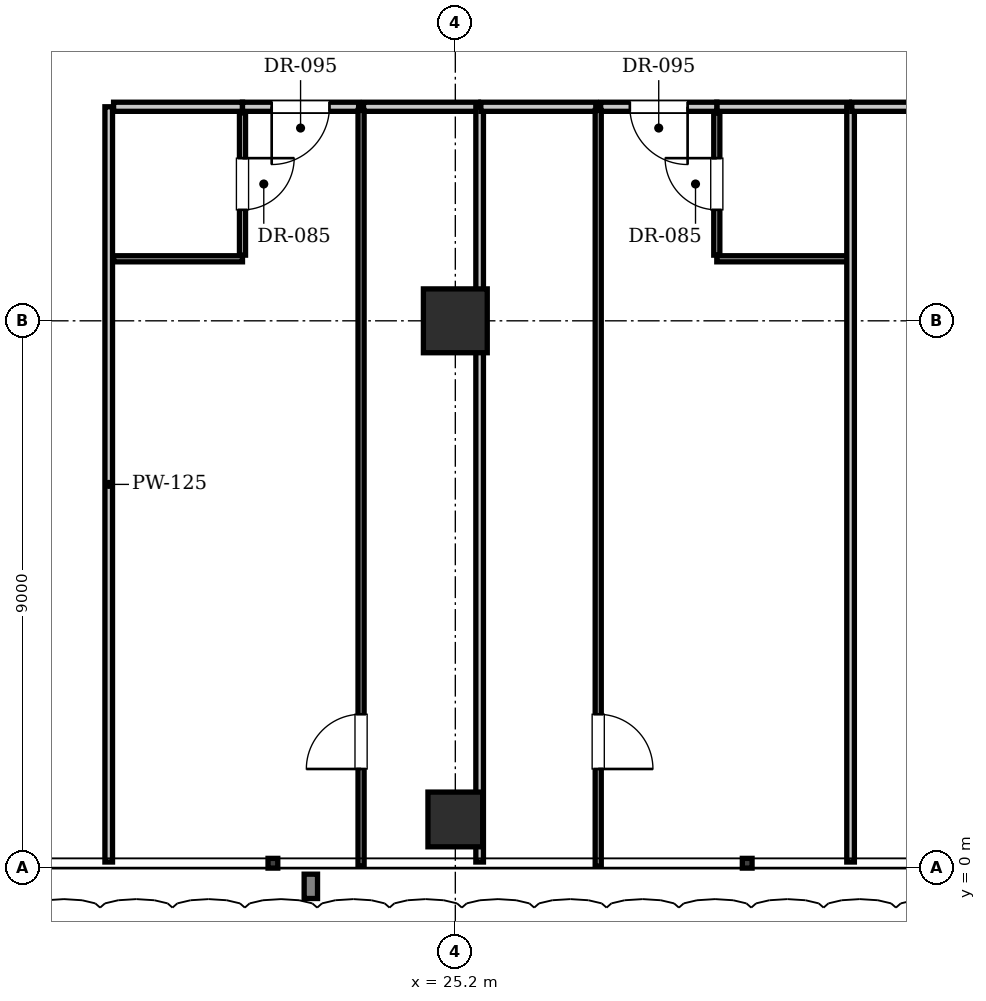
"""IFC4 building model, lengths in metres.
Left out: names, types, materials, properties, quantities, classifications, styles, units other than length and angle.
Written with IfcOpenShell. Run it as: python <this file> out.ifc"""

import sys

from ifc_helpers import new_model, si_unit, direction, frame, frame_2d, origin, origin_2d, place, context, subcontext, project, spatial, rectangle, extrude, element, fill, save


model = new_model("IFC4")
c1 = context("Model", 3, precision=1e-05, world=origin(), true_north=direction((0.0, 1.0)))
c2 = subcontext(c1, "Body", "Model", "MODEL_VIEW")
j1 = project(units=[si_unit("LENGTHUNIT", "METRE"), si_unit("PLANEANGLEUNIT", "RADIAN")], contexts=[c1])
p1 = place(None, origin())
s1 = spatial("IfcSite", under=j1, at=p1, CompositionType="ELEMENT")
p2 = place(p1, origin())
s2 = spatial("IfcBuilding", under=s1, at=p2, CompositionType="ELEMENT")
p3 = place(p2, frame((0.0, 0.0, 38.5)))
s3 = spatial("IfcBuildingStorey", under=s2, at=p3, CompositionType="ELEMENT", Elevation=38.5)
p4 = place(p3, frame((25.2, 9.0, 0.0), z_axis=(0.0, 0.0, 1.0), x_axis=(1.0, 0.0, 0.0)))
e1 = element("IfcColumn", 1, at=p4, inside=s3, PredefinedType="COLUMN", context=c2, shape_type="SweptSolid", body=[
    extrude(rectangle(XDim=1.05, YDim=1.05, at=origin_2d()), origin(), (0.0, 0.0, 1.0), 3.85),
])
p5 = place(p3, frame((25.2, 0.8, 0.0), z_axis=(0.0, 0.0, 1.0), x_axis=(1.0, 0.0, 0.0)))
e2 = element("IfcColumn", 2, at=p5, inside=s3, PredefinedType="COLUMN", context=c2, shape_type="SweptSolid", body=[
    extrude(rectangle(XDim=0.9, YDim=0.9, at=origin_2d()), origin(), (0.0, 0.0, 1.0), 3.85),
])
p6 = place(p3, frame((19.5, 0.1, 0.0), z_axis=(0.0, 0.0, 1.0), x_axis=(0.0, 1.0, 0.0)))
e3 = element("IfcWall", 3, at=p6, inside=s3, PredefinedType="PARTITIONING", context=c2, shape_type="SweptSolid", body=[
    extrude(rectangle(XDim=12.42, YDim=0.125, at=frame_2d((6.21, 0.0))), origin(), (0.0, 0.0, 1.0), 3.61),
])
p7 = place(p3, frame((19.58, 12.52, 0.0), z_axis=(0.0, 0.0, 1.0), x_axis=(1.0, 0.0, 0.0)))
e4 = element("IfcWall", 4, at=p7, inside=s3, PredefinedType="PARTITIONING", context=c2, shape_type="SweptSolid", body=[
    extrude(rectangle(XDim=2.12, YDim=0.15, at=frame_2d((1.06, 0.0))), origin(), (0.0, 0.0, 1.0), 3.61),
])
p8 = place(p3, frame((19.58, 10.02, 0.0), z_axis=(0.0, 0.0, 1.0), x_axis=(1.0, 0.0, 0.0)))
e5 = element("IfcWall", 5, at=p8, inside=s3, PredefinedType="PARTITIONING", context=c2, shape_type="SweptSolid", body=[
    extrude(rectangle(XDim=2.12, YDim=0.1, at=frame_2d((1.06, 0.0))), origin(), (0.0, 0.0, 1.0), 3.61),
])
p9 = place(p3, frame((21.7, 10.08, 0.0), z_axis=(0.0, 0.0, 1.0), x_axis=(0.0, 1.0, 0.0)))
e6 = element("IfcWall", 6, at=p9, inside=s3, PredefinedType="PARTITIONING", context=c2, shape_type="SweptSolid", body=[
    extrude(rectangle(XDim=2.34, YDim=0.1, at=frame_2d((1.17, 0.0))), origin(), (0.0, 0.0, 1.0), 3.61),
])
p10 = place(p9, frame((0.745, 0.0, 0.0)))
e7 = element("IfcOpeningElement", 7, at=p10, cuts=e6, PredefinedType="OPENING", context=c2, shape_type="SweptSolid", body=[
    extrude(rectangle(XDim=0.85, YDim=2.1, at=frame_2d((0.425, 1.05))), frame((0.0, 0.06, 0.0), z_axis=(0.0, -1.0, 0.0), x_axis=(1.0, 0.0, 0.0)), (0.0, 0.0, 1.0), 0.12),
])
p11 = place(p3, frame((21.7, 12.52, 0.0), z_axis=(0.0, 0.0, 1.0), x_axis=(1.0, 0.0, 0.0)))
e8 = element("IfcWall", 8, at=p11, inside=s3, PredefinedType="PARTITIONING", context=c2, shape_type="SweptSolid", body=[
    extrude(rectangle(XDim=1.91, YDim=0.15, at=frame_2d((0.955, 0.0))), origin(), (0.0, 0.0, 1.0), 3.61),
])
p12 = place(p11, frame((0.48, 0.0, 0.0)))
e9 = element("IfcOpeningElement", 9, at=p12, cuts=e8, PredefinedType="OPENING", context=c2, shape_type="SweptSolid", body=[
    extrude(rectangle(XDim=0.95, YDim=2.15, at=frame_2d((0.475, 1.075))), frame((0.0, 0.085, 0.0), z_axis=(0.0, -1.0, 0.0), x_axis=(1.0, 0.0, 0.0)), (0.0, 0.0, 1.0), 0.17),
])
p13 = place(p3, frame((23.69, 12.52, 0.0), z_axis=(0.0, 0.0, 1.0), x_axis=(1.0, 0.0, 0.0)))
e10 = element("IfcWall", 10, at=p13, inside=s3, PredefinedType="PARTITIONING", context=c2, shape_type="SweptSolid", body=[
    extrude(rectangle(XDim=1.89, YDim=0.15, at=frame_2d((0.945, 0.0))), origin(), (0.0, 0.0, 1.0), 3.61),
])
p14 = place(p3, frame((23.65, 0.03, 0.0), z_axis=(0.0, 0.0, 1.0), x_axis=(0.0, 1.0, 0.0)))
e11 = element("IfcWall", 11, at=p14, inside=s3, PredefinedType="PARTITIONING", context=c2, shape_type="SweptSolid", body=[
    extrude(rectangle(XDim=12.43, YDim=0.1, at=frame_2d((6.215, 0.0))), origin(), (0.0, 0.0, 1.0), 3.61),
])
p15 = place(p14, frame((1.6, 0.0, 0.0)))
e12 = element("IfcOpeningElement", 12, at=p15, cuts=e11, PredefinedType="OPENING", context=c2, shape_type="SweptSolid", body=[
    extrude(rectangle(XDim=0.9, YDim=2.1, at=frame_2d((0.45, 1.05))), frame((0.0, 0.06, 0.0), z_axis=(0.0, -1.0, 0.0), x_axis=(1.0, 0.0, 0.0)), (0.0, 0.0, 1.0), 0.12),
])
p16 = place(p3, frame((25.6, 0.1, 0.0), z_axis=(0.0, 0.0, 1.0), x_axis=(0.0, 1.0, 0.0)))
e13 = element("IfcWall", 13, at=p16, inside=s3, PredefinedType="PARTITIONING", context=c2, shape_type="SweptSolid", body=[
    extrude(rectangle(XDim=12.42, YDim=0.125, at=frame_2d((6.21, 0.0))), origin(), (0.0, 0.0, 1.0), 3.61),
])
p17 = place(p3, frame((29.5, 12.52, 0.0), z_axis=(0.0, 0.0, 1.0), x_axis=(1.0, 0.0, 0.0)))
e14 = element("IfcWall", 14, at=p17, inside=s3, PredefinedType="PARTITIONING", context=c2, shape_type="SweptSolid", body=[
    extrude(rectangle(XDim=2.18, YDim=0.15, at=frame_2d((1.09, 0.0))), origin(), (0.0, 0.0, 1.0), 3.61),
])
p18 = place(p3, frame((29.5, 10.02, 0.0), z_axis=(0.0, 0.0, 1.0), x_axis=(1.0, 0.0, 0.0)))
e15 = element("IfcWall", 15, at=p18, inside=s3, PredefinedType="PARTITIONING", context=c2, shape_type="SweptSolid", body=[
    extrude(rectangle(XDim=2.16, YDim=0.1, at=frame_2d((1.08, 0.0))), origin(), (0.0, 0.0, 1.0), 3.61),
])
p19 = place(p3, frame((29.5, 10.08, 0.0), z_axis=(0.0, 0.0, 1.0), x_axis=(0.0, 1.0, 0.0)))
e16 = element("IfcWall", 16, at=p19, inside=s3, PredefinedType="PARTITIONING", context=c2, shape_type="SweptSolid", body=[
    extrude(rectangle(XDim=2.34, YDim=0.1, at=frame_2d((1.17, 0.0))), origin(), (0.0, 0.0, 1.0), 3.207),
])
p20 = place(p19, frame((0.745, 0.0, 0.0)))
e17 = element("IfcOpeningElement", 17, at=p20, cuts=e16, PredefinedType="OPENING", context=c2, shape_type="SweptSolid", body=[
    extrude(rectangle(XDim=0.85, YDim=2.1, at=frame_2d((0.425, 1.05))), frame((0.0, 0.06, 0.0), z_axis=(0.0, -1.0, 0.0), x_axis=(1.0, 0.0, 0.0)), (0.0, 0.0, 1.0), 0.12),
])
p21 = place(p3, frame((25.62, 12.52, 0.0), z_axis=(0.0, 0.0, 1.0), x_axis=(1.0, 0.0, 0.0)))
e18 = element("IfcWall", 18, at=p21, inside=s3, PredefinedType="PARTITIONING", context=c2, shape_type="SweptSolid", body=[
    extrude(rectangle(XDim=1.89, YDim=0.15, at=frame_2d((0.945, 0.0))), origin(), (0.0, 0.0, 1.0), 3.61),
])
p22 = place(p3, frame((27.59, 12.52, 0.0), z_axis=(0.0, 0.0, 1.0), x_axis=(1.0, 0.0, 0.0)))
e19 = element("IfcWall", 19, at=p22, inside=s3, PredefinedType="PARTITIONING", context=c2, shape_type="SweptSolid", body=[
    extrude(rectangle(XDim=1.91, YDim=0.15, at=frame_2d((0.955, 0.0))), origin(), (0.0, 0.0, 1.0), 3.61),
])
p23 = place(p22, frame((0.48, 0.0, 0.0)))
e20 = element("IfcOpeningElement", 20, at=p23, cuts=e19, PredefinedType="OPENING", context=c2, shape_type="SweptSolid", body=[
    extrude(rectangle(XDim=0.95, YDim=2.15, at=frame_2d((0.475, 1.075))), frame((0.0, 0.085, 0.0), z_axis=(0.0, -1.0, 0.0), x_axis=(1.0, 0.0, 0.0)), (0.0, 0.0, 1.0), 0.17),
])
p24 = place(p3, frame((27.55, 0.03, 0.0), z_axis=(0.0, 0.0, 1.0), x_axis=(0.0, 1.0, 0.0)))
e21 = element("IfcWall", 21, at=p24, inside=s3, PredefinedType="PARTITIONING", context=c2, shape_type="SweptSolid", body=[
    extrude(rectangle(XDim=12.43, YDim=0.1, at=frame_2d((6.215, 0.0))), origin(), (0.0, 0.0, 1.0), 3.61),
])
p25 = place(p24, frame((1.6, 0.0, 0.0)))
e22 = element("IfcOpeningElement", 22, at=p25, cuts=e21, PredefinedType="OPENING", context=c2, shape_type="SweptSolid", body=[
    extrude(rectangle(XDim=0.9, YDim=2.1, at=frame_2d((0.45, 1.05))), frame((0.0, 0.06, 0.0), z_axis=(0.0, -1.0, 0.0), x_axis=(1.0, 0.0, 0.0)), (0.0, 0.0, 1.0), 0.12),
])
p26 = place(p3, frame((31.7, 0.1, 0.0), z_axis=(0.0, 0.0, 1.0), x_axis=(0.0, 1.0, 0.0)))
e23 = element("IfcWall", 23, at=p26, inside=s3, PredefinedType="PARTITIONING", context=c2, shape_type="SweptSolid", body=[
    extrude(rectangle(XDim=12.42, YDim=0.125, at=frame_2d((6.21, 0.0))), origin(), (0.0, 0.0, 1.0), 3.61),
])
p27 = place(p3, frame((31.72, 12.52, 0.0), z_axis=(0.0, 0.0, 1.0), x_axis=(1.0, 0.0, 0.0)))
e24 = element("IfcWall", 24, at=p27, inside=s3, PredefinedType="PARTITIONING", context=c2, shape_type="SweptSolid", body=[
    extrude(rectangle(XDim=1.89, YDim=0.15, at=frame_2d((0.945, 0.0))), origin(), (0.0, 0.0, 1.0), 3.61),
])
p28 = place(p10, frame((0.85, 0.0, 0.0), z_axis=(0.0, 0.0, 1.0), x_axis=(-1.0, 0.0, 0.0)))
e25 = element("IfcDoor", 25, at=p28, inside=s3, OperationType="SINGLE_SWING_LEFT", PredefinedType="DOOR", context=c2, shape_type="SweptSolid", body=[
    extrude(rectangle(XDim=0.85, YDim=2.1, at=frame_2d((0.425, 1.05))), frame((0.0, 0.025, 0.0), z_axis=(0.0, -1.0, 0.0), x_axis=(1.0, 0.0, 0.0)), (0.0, 0.0, 1.0), 0.05),
])
fill(e7, e25)
p29 = place(p12, frame((0.95, 0.0, 0.0), z_axis=(0.0, 0.0, 1.0), x_axis=(-1.0, 0.0, 0.0)))
e26 = element("IfcDoor", 26, at=p29, inside=s3, OperationType="SINGLE_SWING_RIGHT", PredefinedType="DOOR", context=c2, shape_type="SweptSolid", body=[
    extrude(rectangle(XDim=0.95, YDim=2.15, at=frame_2d((0.475, 1.075))), frame((0.0, 0.025, 0.0), z_axis=(0.0, -1.0, 0.0), x_axis=(1.0, 0.0, 0.0)), (0.0, 0.0, 1.0), 0.05),
])
fill(e9, e26)
p30 = place(p15, origin())
e27 = element("IfcDoor", 27, at=p30, inside=s3, OperationType="SINGLE_SWING_LEFT", PredefinedType="DOOR", context=c2, shape_type="SweptSolid", body=[
    extrude(rectangle(XDim=0.9, YDim=2.1, at=frame_2d((0.45, 1.05))), frame((0.0, 0.025, 0.0), z_axis=(0.0, -1.0, 0.0), x_axis=(1.0, 0.0, 0.0)), (0.0, 0.0, 1.0), 0.05),
])
fill(e12, e27)
p31 = place(p20, origin())
e28 = element("IfcDoor", 28, at=p31, inside=s3, OperationType="SINGLE_SWING_RIGHT", PredefinedType="DOOR", context=c2, shape_type="SweptSolid", body=[
    extrude(rectangle(XDim=0.85, YDim=2.1, at=frame_2d((0.425, 1.05))), frame((0.0, 0.025, 0.0), z_axis=(0.0, -1.0, 0.0), x_axis=(1.0, 0.0, 0.0)), (0.0, 0.0, 1.0), 0.05),
])
fill(e17, e28)
p32 = place(p23, frame((0.95, 0.0, 0.0), z_axis=(0.0, 0.0, 1.0), x_axis=(-1.0, 0.0, 0.0)))
e29 = element("IfcDoor", 29, at=p32, inside=s3, OperationType="SINGLE_SWING_LEFT", PredefinedType="DOOR", context=c2, shape_type="SweptSolid", body=[
    extrude(rectangle(XDim=0.95, YDim=2.15, at=frame_2d((0.475, 1.075))), frame((0.0, 0.025, 0.0), z_axis=(0.0, -1.0, 0.0), x_axis=(1.0, 0.0, 0.0)), (0.0, 0.0, 1.0), 0.05),
])
fill(e20, e29)
p33 = place(p25, frame((0.9, 0.0, 0.0), z_axis=(0.0, 0.0, 1.0), x_axis=(-1.0, 0.0, 0.0)))
e30 = element("IfcDoor", 30, at=p33, inside=s3, OperationType="SINGLE_SWING_RIGHT", PredefinedType="DOOR", context=c2, shape_type="SweptSolid", body=[
    extrude(rectangle(XDim=0.9, YDim=2.1, at=frame_2d((0.45, 1.05))), frame((0.0, 0.025, 0.0), z_axis=(0.0, -1.0, 0.0), x_axis=(1.0, 0.0, 0.0)), (0.0, 0.0, 1.0), 0.05),
])
fill(e22, e30)
save(model, sys.argv[1])
